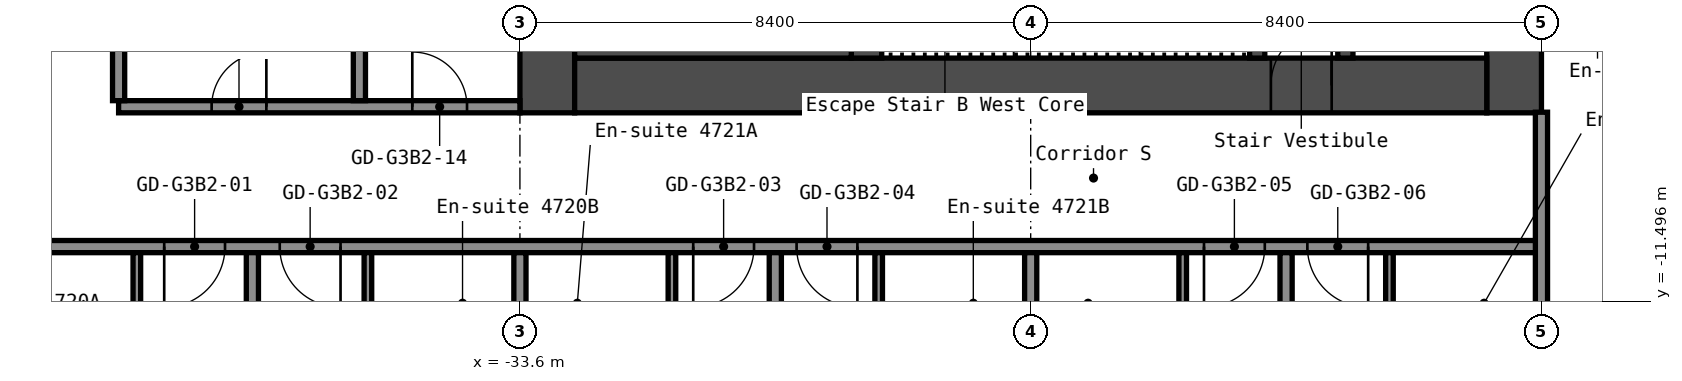
"""IFC4 building model, lengths in metres.
Left out: names, types, materials, properties, quantities, classifications, styles, units other than length and angle.
Written with IfcOpenShell. Run it as: python <this file> out.ifc"""

import sys

from ifc_helpers import new_model, si_unit, direction, frame, frame_2d, origin, place, context, subcontext, project, spatial, rectangle, extrude, element, fill, save


model = new_model("IFC4")
c1 = context("Model", 3, precision=1e-05, world=origin(), true_north=direction((0.0, 1.0)))
c2 = subcontext(c1, "Body", "Model", "MODEL_VIEW")
j1 = project(units=[si_unit("LENGTHUNIT", "METRE"), si_unit("PLANEANGLEUNIT", "RADIAN")], contexts=[c1])
p1 = place(None, origin())
s1 = spatial("IfcSite", under=j1, at=p1, CompositionType="ELEMENT")
p2 = place(p1, origin())
s2 = spatial("IfcBuilding", under=s1, at=p2, CompositionType="ELEMENT")
p3 = place(p2, frame((0.0, 0.0, 166.2)))
s3 = spatial("IfcBuildingStorey", under=s2, at=p3, CompositionType="ELEMENT", Elevation=166.2)
p4 = place(p3, frame((-17.25, -8.4, 0.0), z_axis=(0.0, 0.0, 1.0), x_axis=(0.0, 1.0, 0.0)))
e1 = element("IfcWall", 1, at=p4, inside=s3, PredefinedType="SHEAR", context=c2, shape_type="SweptSolid", body=[
    extrude(rectangle(XDim=16.8, YDim=0.9, at=frame_2d((8.4, 0.0))), origin(), (0.0, 0.0, 1.0), 2.75),
])
p5 = place(p4, frame((7.1, 0.0, 0.0)))
e2 = element("IfcOpeningElement", 2, at=p5, cuts=e1, PredefinedType="OPENING", context=c2, shape_type="SweptSolid", body=[
    extrude(rectangle(XDim=1.6, YDim=2.1, at=frame_2d((0.8, 1.05))), frame((0.0, 0.46, 0.0), z_axis=(0.0, -1.0, 0.0), x_axis=(1.0, 0.0, 0.0)), (0.0, 0.0, 1.0), 0.92),
])
p6 = place(p3, frame((-33.15, -8.4, 0.0), z_axis=(0.0, 0.0, 1.0), x_axis=(0.0, 1.0, 0.0)))
e3 = element("IfcWall", 3, at=p6, inside=s3, PredefinedType="SHEAR", context=c2, shape_type="SweptSolid", body=[
    extrude(rectangle(XDim=16.8, YDim=0.9, at=frame_2d((8.4, 0.0))), origin(), (0.0, 0.0, 1.0), 2.75),
])
p7 = place(p3, frame((-32.7, -7.95, 0.0), z_axis=(0.0, 0.0, 1.0), x_axis=(1.0, 0.0, 0.0)))
e4 = element("IfcWall", 4, at=p7, inside=s3, PredefinedType="SHEAR", context=c2, shape_type="SweptSolid", body=[
    extrude(rectangle(XDim=15.0, YDim=0.9, at=frame_2d((7.5, 0.0))), origin(), (0.0, 0.0, 1.0), 2.75),
])
p8 = place(p7, frame((11.45, 0.0, 0.0)))
e5 = element("IfcOpeningElement", 5, at=p8, cuts=e4, PredefinedType="OPENING", context=c2, shape_type="SweptSolid", body=[
    extrude(rectangle(XDim=1.0, YDim=2.1, at=frame_2d((0.5, 1.05))), frame((0.0, 0.46, 0.0), z_axis=(0.0, -1.0, 0.0), x_axis=(1.0, 0.0, 0.0)), (0.0, 0.0, 1.0), 0.92),
])
p9 = place(p3, frame((-20.025, -7.5, 0.0), z_axis=(0.0, 0.0, 1.0), x_axis=(0.0, 1.0, 0.0)))
e6 = element("IfcWall", 6, at=p9, inside=s3, PredefinedType="SHEAR", context=c2, shape_type="SweptSolid", body=[
    extrude(rectangle(XDim=6.3, YDim=0.25, at=frame_2d((3.15, 0.0))), origin(), (0.0, 0.0, 1.0), 2.75),
])
p10 = place(p9, frame((2.4, 0.0, 0.0)))
e7 = element("IfcOpeningElement", 7, at=p10, cuts=e6, PredefinedType="OPENING", context=c2, shape_type="SweptSolid", body=[
    extrude(rectangle(XDim=1.0, YDim=2.1, at=frame_2d((0.5, 1.05))), frame((0.0, 0.135, 0.0), z_axis=(0.0, -1.0, 0.0), x_axis=(1.0, 0.0, 0.0)), (0.0, 0.0, 1.0), 0.27),
])
p11 = place(p3, frame((-21.475, -7.5, 0.0), z_axis=(0.0, 0.0, 1.0), x_axis=(0.0, 1.0, 0.0)))
e8 = element("IfcWall", 8, at=p11, inside=s3, PredefinedType="SHEAR", context=c2, shape_type="SweptSolid", body=[
    extrude(rectangle(XDim=3.75, YDim=0.25, at=frame_2d((1.875, 0.0))), origin(), (0.0, 0.0, 1.0), 2.75),
])
p12 = place(p11, frame((1.3, 0.0, 0.0)))
e9 = element("IfcOpeningElement", 9, at=p12, cuts=e8, PredefinedType="OPENING", context=c2, shape_type="SweptSolid", body=[
    extrude(rectangle(XDim=1.2, YDim=2.1, at=frame_2d((0.6, 1.05))), frame((0.0, 0.135, 0.0), z_axis=(0.0, -1.0, 0.0), x_axis=(1.0, 0.0, 0.0)), (0.0, 0.0, 1.0), 0.27),
])
p13 = place(p3, frame((-27.9, -7.5, 0.0), z_axis=(0.0, 0.0, 1.0), x_axis=(0.0, 1.0, 0.0)))
e10 = element("IfcWall", 10, at=p13, inside=s3, PredefinedType="SHEAR", context=c2, shape_type="SweptSolid", body=[
    extrude(rectangle(XDim=3.75, YDim=0.5, at=frame_2d((1.875, 0.0))), origin(), (0.0, 0.0, 1.0), 2.75),
])
p14 = place(p3, frame((-32.7, -6.75, 0.0), z_axis=(0.0, 0.0, 1.0), x_axis=(1.0, 0.0, 0.0)))
e11 = element("IfcWall", 11, at=p14, inside=s3, PredefinedType="SHEAR", context=c2, shape_type="SweptSolid", body=[
    extrude(rectangle(XDim=4.55, YDim=1.5, at=frame_2d((2.275, 0.0))), origin(), (0.0, 0.0, 1.0), 2.75),
])
p15 = place(p3, frame((-42.7, -10.6, 0.0), z_axis=(0.0, 0.0, 1.0), x_axis=(1.0, 0.0, 0.0)))
e12 = element("IfcWall", 12, at=p15, inside=s3, PredefinedType="PARTITIONING", context=c2, shape_type="SweptSolid", body=[
    extrude(rectangle(XDim=25.9, YDim=0.2, at=frame_2d((12.95, 0.0))), origin(), (0.0, 0.0, 1.0), 2.75),
])
p16 = place(p15, frame((3.25, 0.0, 0.0)))
e13 = element("IfcOpeningElement", 13, at=p16, cuts=e12, PredefinedType="OPENING", context=c2, shape_type="SweptSolid", body=[
    extrude(rectangle(XDim=1.0, YDim=2.1, at=frame_2d((0.5, 1.05))), frame((0.0, 0.11, 0.0), z_axis=(0.0, -1.0, 0.0), x_axis=(1.0, 0.0, 0.0)), (0.0, 0.0, 1.0), 0.22),
])
p17 = place(p15, frame((5.15, 0.0, 0.0)))
e14 = element("IfcOpeningElement", 14, at=p17, cuts=e12, PredefinedType="OPENING", context=c2, shape_type="SweptSolid", body=[
    extrude(rectangle(XDim=1.0, YDim=2.1, at=frame_2d((0.5, 1.05))), frame((0.0, 0.11, 0.0), z_axis=(0.0, -1.0, 0.0), x_axis=(1.0, 0.0, 0.0)), (0.0, 0.0, 1.0), 0.22),
])
p18 = place(p15, frame((11.95, 0.0, 0.0)))
e15 = element("IfcOpeningElement", 15, at=p18, cuts=e12, PredefinedType="OPENING", context=c2, shape_type="SweptSolid", body=[
    extrude(rectangle(XDim=1.0, YDim=2.1, at=frame_2d((0.5, 1.05))), frame((0.0, 0.11, 0.0), z_axis=(0.0, -1.0, 0.0), x_axis=(1.0, 0.0, 0.0)), (0.0, 0.0, 1.0), 0.22),
])
p19 = place(p15, frame((13.65, 0.0, 0.0)))
e16 = element("IfcOpeningElement", 16, at=p19, cuts=e12, PredefinedType="OPENING", context=c2, shape_type="SweptSolid", body=[
    extrude(rectangle(XDim=1.0, YDim=2.1, at=frame_2d((0.5, 1.05))), frame((0.0, 0.11, 0.0), z_axis=(0.0, -1.0, 0.0), x_axis=(1.0, 0.0, 0.0)), (0.0, 0.0, 1.0), 0.22),
])
p20 = place(p15, frame((20.35, 0.0, 0.0)))
e17 = element("IfcOpeningElement", 17, at=p20, cuts=e12, PredefinedType="OPENING", context=c2, shape_type="SweptSolid", body=[
    extrude(rectangle(XDim=1.0, YDim=2.1, at=frame_2d((0.5, 1.05))), frame((0.0, 0.11, 0.0), z_axis=(0.0, -1.0, 0.0), x_axis=(1.0, 0.0, 0.0)), (0.0, 0.0, 1.0), 0.22),
])
p21 = place(p15, frame((22.05, 0.0, 0.0)))
e18 = element("IfcOpeningElement", 18, at=p21, cuts=e12, PredefinedType="OPENING", context=c2, shape_type="SweptSolid", body=[
    extrude(rectangle(XDim=1.0, YDim=2.1, at=frame_2d((0.5, 1.05))), frame((0.0, 0.11, 0.0), z_axis=(0.0, -1.0, 0.0), x_axis=(1.0, 0.0, 0.0)), (0.0, 0.0, 1.0), 0.22),
])
p22 = place(p3, frame((-40.2, -8.3, 0.0), z_axis=(0.0, 0.0, 1.0), x_axis=(1.0, 0.0, 0.0)))
e19 = element("IfcWall", 19, at=p22, inside=s3, PredefinedType="PARTITIONING", context=c2, shape_type="SweptSolid", body=[
    extrude(rectangle(XDim=6.6, YDim=0.2, at=frame_2d((3.3, 0.0))), origin(), (0.0, 0.0, 1.0), 2.75),
])
p23 = place(p22, frame((1.53, 0.0, 0.0)))
e20 = element("IfcOpeningElement", 20, at=p23, cuts=e19, PredefinedType="OPENING", context=c2, shape_type="SweptSolid", body=[
    extrude(rectangle(XDim=0.9, YDim=2.1, at=frame_2d((0.45, 1.05))), frame((0.0, 0.11, 0.0), z_axis=(0.0, -1.0, 0.0), x_axis=(1.0, 0.0, 0.0)), (0.0, 0.0, 1.0), 0.22),
])
p24 = place(p22, frame((4.83, 0.0, 0.0)))
e21 = element("IfcOpeningElement", 21, at=p24, cuts=e19, PredefinedType="OPENING", context=c2, shape_type="SweptSolid", body=[
    extrude(rectangle(XDim=0.9, YDim=2.1, at=frame_2d((0.45, 1.05))), frame((0.0, 0.11, 0.0), z_axis=(0.0, -1.0, 0.0), x_axis=(1.0, 0.0, 0.0)), (0.0, 0.0, 1.0), 0.22),
])
p25 = place(p3, frame((-40.2, -8.2, 0.0), z_axis=(0.0, 0.0, 1.0), x_axis=(0.0, 1.0, 0.0)))
e22 = element("IfcWall", 22, at=p25, inside=s3, PredefinedType="PARTITIONING", context=c2, shape_type="SweptSolid", body=[
    extrude(rectangle(XDim=16.4, YDim=0.2, at=frame_2d((8.2, 0.0))), origin(), (0.0, 0.0, 1.0), 2.75),
])
p26 = place(p3, frame((-39.9, -13.6, 0.0), z_axis=(0.0, 0.0, 1.0), x_axis=(0.0, 1.0, 0.0)))
e23 = element("IfcWall", 23, at=p26, inside=s3, PredefinedType="PARTITIONING", context=c2, shape_type="SweptSolid", body=[
    extrude(rectangle(XDim=2.9, YDim=0.125, at=frame_2d((1.45, 0.0))), origin(), (0.0, 0.0, 1.0), 2.75),
])
p27 = place(p26, frame((0.6, 0.0, 0.0)))
e24 = element("IfcOpeningElement", 24, at=p27, cuts=e23, PredefinedType="OPENING", context=c2, shape_type="SweptSolid", body=[
    extrude(rectangle(XDim=0.8, YDim=2.1, at=frame_2d((0.4, 1.05))), frame((0.0, 0.073, 0.0), z_axis=(0.0, -1.0, 0.0), x_axis=(1.0, 0.0, 0.0)), (0.0, 0.0, 1.0), 0.145),
])
p28 = place(p3, frame((-38.0, -19.3, 0.0), z_axis=(0.0, 0.0, 1.0), x_axis=(0.0, 1.0, 0.0)))
e25 = element("IfcWall", 25, at=p28, inside=s3, PredefinedType="PARTITIONING", context=c2, shape_type="SweptSolid", body=[
    extrude(rectangle(XDim=8.6, YDim=0.2, at=frame_2d((4.3, 0.0))), origin(), (0.0, 0.0, 1.0), 2.75),
])
p29 = place(p3, frame((-36.24, -8.2, 0.0), z_axis=(0.0, 0.0, 1.0), x_axis=(0.0, 1.0, 0.0)))
e26 = element("IfcWall", 26, at=p29, inside=s3, PredefinedType="PARTITIONING", context=c2, shape_type="SweptSolid", body=[
    extrude(rectangle(XDim=8.2, YDim=0.2, at=frame_2d((4.1, 0.0))), origin(), (0.0, 0.0, 1.0), 2.75),
])
p30 = place(p3, frame((-36.1, -13.6, 0.0), z_axis=(0.0, 0.0, 1.0), x_axis=(0.0, 1.0, 0.0)))
e27 = element("IfcWall", 27, at=p30, inside=s3, PredefinedType="PARTITIONING", context=c2, shape_type="SweptSolid", body=[
    extrude(rectangle(XDim=2.9, YDim=0.125, at=frame_2d((1.45, 0.0))), origin(), (0.0, 0.0, 1.0), 2.75),
])
p31 = place(p30, frame((0.6, 0.0, 0.0)))
e28 = element("IfcOpeningElement", 28, at=p31, cuts=e27, PredefinedType="OPENING", context=c2, shape_type="SweptSolid", body=[
    extrude(rectangle(XDim=0.8, YDim=2.1, at=frame_2d((0.4, 1.05))), frame((0.0, 0.073, 0.0), z_axis=(0.0, -1.0, 0.0), x_axis=(1.0, 0.0, 0.0)), (0.0, 0.0, 1.0), 0.145),
])
p32 = place(p3, frame((-33.6, -19.3, 0.0), z_axis=(0.0, 0.0, 1.0), x_axis=(0.0, 1.0, 0.0)))
e29 = element("IfcWall", 29, at=p32, inside=s3, PredefinedType="PARTITIONING", context=c2, shape_type="SweptSolid", body=[
    extrude(rectangle(XDim=8.6, YDim=0.2, at=frame_2d((4.3, 0.0))), origin(), (0.0, 0.0, 1.0), 2.75),
])
p33 = place(p3, frame((-31.1, -13.6, 0.0), z_axis=(0.0, 0.0, 1.0), x_axis=(0.0, 1.0, 0.0)))
e30 = element("IfcWall", 30, at=p33, inside=s3, PredefinedType="PARTITIONING", context=c2, shape_type="SweptSolid", body=[
    extrude(rectangle(XDim=2.9, YDim=0.125, at=frame_2d((1.45, 0.0))), origin(), (0.0, 0.0, 1.0), 2.75),
])
p34 = place(p33, frame((0.6, 0.0, 0.0)))
e31 = element("IfcOpeningElement", 31, at=p34, cuts=e30, PredefinedType="OPENING", context=c2, shape_type="SweptSolid", body=[
    extrude(rectangle(XDim=0.8, YDim=2.1, at=frame_2d((0.4, 1.05))), frame((0.0, 0.073, 0.0), z_axis=(0.0, -1.0, 0.0), x_axis=(1.0, 0.0, 0.0)), (0.0, 0.0, 1.0), 0.145),
])
p35 = place(p3, frame((-29.4, -19.3, 0.0), z_axis=(0.0, 0.0, 1.0), x_axis=(0.0, 1.0, 0.0)))
e32 = element("IfcWall", 32, at=p35, inside=s3, PredefinedType="PARTITIONING", context=c2, shape_type="SweptSolid", body=[
    extrude(rectangle(XDim=8.6, YDim=0.2, at=frame_2d((4.3, 0.0))), origin(), (0.0, 0.0, 1.0), 2.75),
])
p36 = place(p3, frame((-27.7, -13.6, 0.0), z_axis=(0.0, 0.0, 1.0), x_axis=(0.0, 1.0, 0.0)))
e33 = element("IfcWall", 33, at=p36, inside=s3, PredefinedType="PARTITIONING", context=c2, shape_type="SweptSolid", body=[
    extrude(rectangle(XDim=2.9, YDim=0.125, at=frame_2d((1.45, 0.0))), origin(), (0.0, 0.0, 1.0), 2.75),
])
p37 = place(p36, frame((0.6, 0.0, 0.0)))
e34 = element("IfcOpeningElement", 34, at=p37, cuts=e33, PredefinedType="OPENING", context=c2, shape_type="SweptSolid", body=[
    extrude(rectangle(XDim=0.8, YDim=2.1, at=frame_2d((0.4, 1.05))), frame((0.0, 0.073, 0.0), z_axis=(0.0, -1.0, 0.0), x_axis=(1.0, 0.0, 0.0)), (0.0, 0.0, 1.0), 0.145),
])
p38 = place(p3, frame((-25.2, -19.3, 0.0), z_axis=(0.0, 0.0, 1.0), x_axis=(0.0, 1.0, 0.0)))
e35 = element("IfcWall", 35, at=p38, inside=s3, PredefinedType="PARTITIONING", context=c2, shape_type="SweptSolid", body=[
    extrude(rectangle(XDim=8.6, YDim=0.2, at=frame_2d((4.3, 0.0))), origin(), (0.0, 0.0, 1.0), 2.75),
])
p39 = place(p3, frame((-22.7, -13.6, 0.0), z_axis=(0.0, 0.0, 1.0), x_axis=(0.0, 1.0, 0.0)))
e36 = element("IfcWall", 36, at=p39, inside=s3, PredefinedType="PARTITIONING", context=c2, shape_type="SweptSolid", body=[
    extrude(rectangle(XDim=2.9, YDim=0.125, at=frame_2d((1.45, 0.0))), origin(), (0.0, 0.0, 1.0), 2.75),
])
p40 = place(p39, frame((0.6, 0.0, 0.0)))
e37 = element("IfcOpeningElement", 37, at=p40, cuts=e36, PredefinedType="OPENING", context=c2, shape_type="SweptSolid", body=[
    extrude(rectangle(XDim=0.8, YDim=2.1, at=frame_2d((0.4, 1.05))), frame((0.0, 0.073, 0.0), z_axis=(0.0, -1.0, 0.0), x_axis=(1.0, 0.0, 0.0)), (0.0, 0.0, 1.0), 0.145),
])
p41 = place(p3, frame((-21.0, -19.3, 0.0), z_axis=(0.0, 0.0, 1.0), x_axis=(0.0, 1.0, 0.0)))
e38 = element("IfcWall", 38, at=p41, inside=s3, PredefinedType="PARTITIONING", context=c2, shape_type="SweptSolid", body=[
    extrude(rectangle(XDim=8.6, YDim=0.2, at=frame_2d((4.3, 0.0))), origin(), (0.0, 0.0, 1.0), 2.75),
])
p42 = place(p3, frame((-19.3, -13.6, 0.0), z_axis=(0.0, 0.0, 1.0), x_axis=(0.0, 1.0, 0.0)))
e39 = element("IfcWall", 39, at=p42, inside=s3, PredefinedType="PARTITIONING", context=c2, shape_type="SweptSolid", body=[
    extrude(rectangle(XDim=2.9, YDim=0.125, at=frame_2d((1.45, 0.0))), origin(), (0.0, 0.0, 1.0), 2.75),
])
p43 = place(p42, frame((0.6, 0.0, 0.0)))
e40 = element("IfcOpeningElement", 40, at=p43, cuts=e39, PredefinedType="OPENING", context=c2, shape_type="SweptSolid", body=[
    extrude(rectangle(XDim=0.8, YDim=2.1, at=frame_2d((0.4, 1.05))), frame((0.0, 0.073, 0.0), z_axis=(0.0, -1.0, 0.0), x_axis=(1.0, 0.0, 0.0)), (0.0, 0.0, 1.0), 0.145),
])
p44 = place(p3, frame((-16.8, -19.3, 0.0), z_axis=(0.0, 0.0, 1.0), x_axis=(0.0, 1.0, 0.0)))
e41 = element("IfcWall", 41, at=p44, inside=s3, PredefinedType="PARTITIONING", context=c2, shape_type="SweptSolid", body=[
    extrude(rectangle(XDim=10.91, YDim=0.2, at=frame_2d((5.455, 0.0))), origin(), (0.0, 0.0, 1.0), 2.75),
])
p45 = place(p8, origin())
e42 = element("IfcDoor", 42, at=p45, inside=s3, OperationType="SINGLE_SWING_LEFT", PredefinedType="DOOR", context=c2, shape_type="SweptSolid", body=[
    extrude(rectangle(XDim=1.0, YDim=2.1, at=frame_2d((0.5, 1.05))), frame((0.0, 0.025, 0.0), z_axis=(0.0, -1.0, 0.0), x_axis=(1.0, 0.0, 0.0)), (0.0, 0.0, 1.0), 0.05),
])
fill(e5, e42)
p46 = place(p16, origin())
e43 = element("IfcDoor", 43, at=p46, inside=s3, OperationType="SINGLE_SWING_LEFT", PredefinedType="DOOR", context=c2, shape_type="SweptSolid", body=[
    extrude(rectangle(XDim=1.0, YDim=2.1, at=frame_2d((0.5, 1.05))), frame((0.0, 0.025, 0.0), z_axis=(0.0, -1.0, 0.0), x_axis=(1.0, 0.0, 0.0)), (0.0, 0.0, 1.0), 0.05),
])
fill(e13, e43)
p47 = place(p17, origin())
e44 = element("IfcDoor", 44, at=p47, inside=s3, OperationType="SINGLE_SWING_RIGHT", PredefinedType="DOOR", context=c2, shape_type="SweptSolid", body=[
    extrude(rectangle(XDim=1.0, YDim=2.1, at=frame_2d((0.5, 1.05))), frame((0.0, 0.025, 0.0), z_axis=(0.0, -1.0, 0.0), x_axis=(1.0, 0.0, 0.0)), (0.0, 0.0, 1.0), 0.05),
])
fill(e14, e44)
p48 = place(p18, origin())
e45 = element("IfcDoor", 45, at=p48, inside=s3, OperationType="SINGLE_SWING_LEFT", PredefinedType="DOOR", context=c2, shape_type="SweptSolid", body=[
    extrude(rectangle(XDim=1.0, YDim=2.1, at=frame_2d((0.5, 1.05))), frame((0.0, 0.025, 0.0), z_axis=(0.0, -1.0, 0.0), x_axis=(1.0, 0.0, 0.0)), (0.0, 0.0, 1.0), 0.05),
])
fill(e15, e45)
p49 = place(p19, origin())
e46 = element("IfcDoor", 46, at=p49, inside=s3, OperationType="SINGLE_SWING_RIGHT", PredefinedType="DOOR", context=c2, shape_type="SweptSolid", body=[
    extrude(rectangle(XDim=1.0, YDim=2.1, at=frame_2d((0.5, 1.05))), frame((0.0, 0.025, 0.0), z_axis=(0.0, -1.0, 0.0), x_axis=(1.0, 0.0, 0.0)), (0.0, 0.0, 1.0), 0.05),
])
fill(e16, e46)
p50 = place(p20, origin())
e47 = element("IfcDoor", 47, at=p50, inside=s3, OperationType="SINGLE_SWING_LEFT", PredefinedType="DOOR", context=c2, shape_type="SweptSolid", body=[
    extrude(rectangle(XDim=1.0, YDim=2.1, at=frame_2d((0.5, 1.05))), frame((0.0, 0.025, 0.0), z_axis=(0.0, -1.0, 0.0), x_axis=(1.0, 0.0, 0.0)), (0.0, 0.0, 1.0), 0.05),
])
fill(e17, e47)
p51 = place(p21, origin())
e48 = element("IfcDoor", 48, at=p51, inside=s3, OperationType="SINGLE_SWING_RIGHT", PredefinedType="DOOR", context=c2, shape_type="SweptSolid", body=[
    extrude(rectangle(XDim=1.0, YDim=2.1, at=frame_2d((0.5, 1.05))), frame((0.0, 0.025, 0.0), z_axis=(0.0, -1.0, 0.0), x_axis=(1.0, 0.0, 0.0)), (0.0, 0.0, 1.0), 0.05),
])
fill(e18, e48)
p52 = place(p23, origin())
e49 = element("IfcDoor", 49, at=p52, inside=s3, OperationType="SINGLE_SWING_LEFT", PredefinedType="DOOR", context=c2, shape_type="SweptSolid", body=[
    extrude(rectangle(XDim=0.9, YDim=2.1, at=frame_2d((0.45, 1.05))), frame((0.0, 0.025, 0.0), z_axis=(0.0, -1.0, 0.0), x_axis=(1.0, 0.0, 0.0)), (0.0, 0.0, 1.0), 0.05),
])
fill(e20, e49)
p53 = place(p24, origin())
e50 = element("IfcDoor", 50, at=p53, inside=s3, OperationType="SINGLE_SWING_RIGHT", PredefinedType="DOOR", context=c2, shape_type="SweptSolid", body=[
    extrude(rectangle(XDim=0.9, YDim=2.1, at=frame_2d((0.45, 1.05))), frame((0.0, 0.025, 0.0), z_axis=(0.0, -1.0, 0.0), x_axis=(1.0, 0.0, 0.0)), (0.0, 0.0, 1.0), 0.05),
])
fill(e21, e50)
save(model, sys.argv[1])
